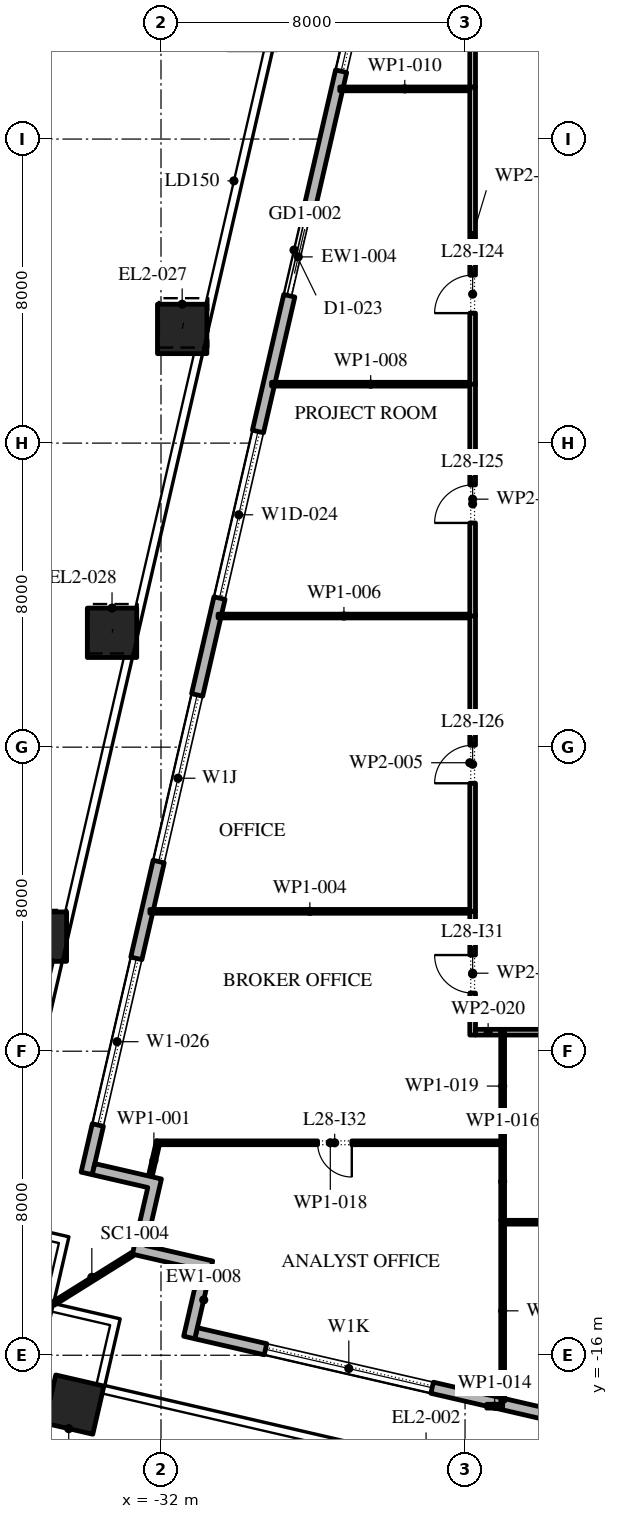
"""IFC4 building model, lengths in metres.
Left out: names, types, materials, properties, quantities, classifications, styles, units other than length and angle.
Written with IfcOpenShell. Run it as: python <this file> out.ifc"""

import sys

from ifc_helpers import new_model, si_unit, direction, frame, frame_2d, origin, origin_2d, place, context, subcontext, project, spatial, polyline, rectangle, outline, extrude, element, fill, save


model = new_model("IFC4")
c1 = context("Model", 3, precision=1e-05, world=origin(), true_north=direction((0.0, 1.0)))
c2 = subcontext(c1, "Body", "Model", "MODEL_VIEW")
j1 = project(units=[si_unit("LENGTHUNIT", "METRE"), si_unit("PLANEANGLEUNIT", "RADIAN")], contexts=[c1])
p1 = place(None, origin())
s1 = spatial("IfcSite", under=j1, at=p1, CompositionType="ELEMENT")
p2 = place(p1, origin())
s2 = spatial("IfcBuilding", under=s1, at=p2, CompositionType="ELEMENT")
p3 = place(p2, frame((0.0, 0.0, 130.8)))
s3 = spatial("IfcBuildingStorey", under=s2, at=p3, CompositionType="ELEMENT", Elevation=130.8)
p4 = place(p3, frame((-34.282, -17.298, 0.0), z_axis=(0.0, 0.0, 1.0), x_axis=(0.974370064785, -0.224951054344, 0.0)))
e1 = element("IfcColumn", 1, at=p4, inside=s3, PredefinedType="COLUMN", context=c2, shape_type="SweptSolid", body=[
    extrude(rectangle(XDim=1.3, YDim=1.3, at=origin_2d()), origin(), (0.0, 0.0, 1.0), 4.2),
])
p5 = place(p3, frame((-29.597, 18.999, 0.0), z_axis=(0.011668267153, 0.050562490995, 0.998652735462), x_axis=(-0.974391195695, 0.224859506699, 0.0)))
e2 = element("IfcColumn", 2, at=p5, inside=s3, PredefinedType="COLUMN", context=c2, shape_type="SweptSolid", body=[
    extrude(rectangle(XDim=1.3, YDim=1.3, at=origin_2d()), origin(), (0.0, 0.0, 1.0), 4.206),
])
p6 = place(p3, frame((-31.443, 11.004, 0.0), z_axis=(0.00871280379, 0.037929739166, 0.999242424008), x_axis=(-0.974617095667, 0.223878352757, 0.0)))
e3 = element("IfcColumn", 3, at=p6, inside=s3, PredefinedType="COLUMN", context=c2, shape_type="SweptSolid", body=[
    extrude(rectangle(XDim=1.3, YDim=1.3, at=origin_2d()), origin(), (0.0, 0.0, 1.0), 4.203),
])
p7 = place(p3, frame((-33.288, 3.009, 0.0), z_axis=(0.005810983994, 0.025277780376, 0.999663576552), x_axis=(-0.974579651079, 0.224041299099, 0.0)))
e4 = element("IfcColumn", 4, at=p7, inside=s3, PredefinedType="COLUMN", context=c2, shape_type="SweptSolid", body=[
    extrude(rectangle(XDim=1.3, YDim=1.3, at=origin_2d()), origin(), (0.0, 0.0, 1.0), 4.201),
])
p8 = place(p3, frame((-35.134, -4.986, 0.0), z_axis=(0.002964350345, 0.012613020097, 0.999916058652), x_axis=(-0.97347596985, 0.228789283237, 0.0)))
e5 = element("IfcColumn", 5, at=p8, inside=s3, PredefinedType="COLUMN", context=c2, shape_type="SweptSolid", body=[
    extrude(rectangle(XDim=1.3, YDim=1.3, at=origin_2d()), origin(), (0.0, 0.0, 1.0), 4.2),
])
p9 = place(p3, frame((-35.631, -15.139, 0.0), z_axis=(0.0, 0.0, 1.0), x_axis=(0.974370064785, -0.224951054344, 0.0)))
e6 = element("IfcColumn", 6, at=p9, inside=s3, PredefinedType="COLUMN", context=c2, shape_type="SweptSolid", body=[
    extrude(rectangle(XDim=1.3, YDim=1.3, at=origin_2d()), origin(), (0.0, 0.0, 1.0), 4.2),
])
p10 = place(p3, frame((-31.078, -15.421, 0.0), z_axis=(0.0, 0.0, 1.0), x_axis=(0.974370456532, -0.224949357493, 0.0)))
e7 = element("IfcWall", 7, at=p10, inside=s3, PredefinedType="STANDARD", context=c2, shape_type="SweptSolid", body=[
    extrude(rectangle(XDim=51.0, YDim=0.3, at=frame_2d((25.5, 0.0))), origin(), (0.0, 0.0, 1.0), 4.0),
])
p11 = place(p10, frame((1.875, 0.0, 0.45)))
e8 = element("IfcOpeningElement", 8, at=p11, cuts=e7, PredefinedType="OPENING", context=c2, shape_type="SweptSolid", body=[
    extrude(rectangle(XDim=4.5, YDim=2.65, at=frame_2d((2.25, 1.325))), frame((0.0, 0.16, 0.0), z_axis=(0.0, -1.0, 0.0), x_axis=(1.0, 0.0, 0.0)), (0.0, 0.0, 1.0), 0.32),
])
p12 = place(p10, frame((10.275, 0.0, 0.45)))
e9 = element("IfcOpeningElement", 9, at=p12, cuts=e7, PredefinedType="OPENING", context=c2, shape_type="SweptSolid", body=[
    extrude(rectangle(XDim=4.5, YDim=2.525, at=frame_2d((2.25, 1.262))), frame((0.0, 0.16, 0.0), z_axis=(0.0, -1.0, 0.0), x_axis=(1.0, 0.0, 0.0)), (0.0, 0.0, 1.0), 0.32),
])
p13 = place(p10, frame((18.825, 0.0, 0.45)))
e10 = element("IfcOpeningElement", 10, at=p13, cuts=e7, PredefinedType="OPENING", context=c2, shape_type="SweptSolid", body=[
    extrude(rectangle(XDim=4.5, YDim=2.5, at=frame_2d((2.25, 1.25))), frame((0.0, 0.16, 0.0), z_axis=(0.0, -1.0, 0.0), x_axis=(1.0, 0.0, 0.0)), (0.0, 0.0, 1.0), 0.32),
])
p14 = place(p10, frame((28.425, 0.0, 0.0)))
e11 = element("IfcOpeningElement", 11, at=p14, cuts=e7, PredefinedType="OPENING", context=c2, shape_type="SweptSolid", body=[
    extrude(rectangle(XDim=2.4, YDim=2.9, at=frame_2d((1.2, 1.45))), frame((0.0, 0.16, 0.0), z_axis=(0.0, -1.0, 0.0), x_axis=(1.0, 0.0, 0.0)), (0.0, 0.0, 1.0), 0.32),
])
p15 = place(p10, frame((35.925, 0.0, 0.45)))
e12 = element("IfcOpeningElement", 12, at=p15, cuts=e7, PredefinedType="OPENING", context=c2, shape_type="SweptSolid", body=[
    extrude(rectangle(XDim=4.5, YDim=2.45, at=frame_2d((2.25, 1.225))), frame((0.0, 0.16, 0.0), z_axis=(0.0, -1.0, 0.0), x_axis=(1.0, 0.0, 0.0)), (0.0, 0.0, 1.0), 0.32),
])
p16 = place(p10, frame((44.475, 0.0, 0.45)))
e13 = element("IfcOpeningElement", 13, at=p16, cuts=e7, PredefinedType="OPENING", context=c2, shape_type="SweptSolid", body=[
    extrude(rectangle(XDim=4.5, YDim=2.45, at=frame_2d((2.25, 1.225))), frame((0.0, 0.16, 0.0), z_axis=(0.0, -1.0, 0.0), x_axis=(1.0, 0.0, 0.0)), (0.0, 0.0, 1.0), 0.32),
])
p17 = place(p3, frame((-22.82, 37.016, 0.0), z_axis=(0.0, 0.0, 1.0), x_axis=(-0.224953880882, -0.974369412223, 0.0)))
e14 = element("IfcWall", 14, at=p17, inside=s3, PredefinedType="STANDARD", context=c2, shape_type="SweptSolid", body=[
    extrude(rectangle(XDim=49.5, YDim=0.3, at=frame_2d((24.75, 0.0))), origin(), (0.0, 0.0, 1.0), 4.0),
])
p18 = place(p17, frame((1.157, 0.0, 0.45)))
e15 = element("IfcOpeningElement", 15, at=p18, cuts=e14, PredefinedType="OPENING", context=c2, shape_type="SweptSolid", body=[
    extrude(rectangle(XDim=4.5, YDim=3.05, at=frame_2d((2.25, 1.525))), frame((0.0, 0.16, 0.0), z_axis=(0.0, -1.0, 0.0), x_axis=(1.0, 0.0, 0.0)), (0.0, 0.0, 1.0), 0.32),
])
p19 = place(p17, frame((8.121, 0.0, 0.45)))
e16 = element("IfcOpeningElement", 16, at=p19, cuts=e14, PredefinedType="OPENING", context=c2, shape_type="SweptSolid", body=[
    extrude(rectangle(XDim=4.5, YDim=3.05, at=frame_2d((2.25, 1.525))), frame((0.0, 0.16, 0.0), z_axis=(0.0, -1.0, 0.0), x_axis=(1.0, 0.0, 0.0)), (0.0, 0.0, 1.0), 0.32),
])
p20 = place(p17, frame((15.236, 0.0, 0.45)))
e17 = element("IfcOpeningElement", 17, at=p20, cuts=e14, PredefinedType="OPENING", context=c2, shape_type="SweptSolid", body=[
    extrude(rectangle(XDim=4.5, YDim=3.05, at=frame_2d((2.25, 1.525))), frame((0.0, 0.16, 0.0), z_axis=(0.0, -1.0, 0.0), x_axis=(1.0, 0.0, 0.0)), (0.0, 0.0, 1.0), 0.32),
])
p21 = place(p17, frame((23.4, 0.0, 0.0)))
e18 = element("IfcOpeningElement", 18, at=p21, cuts=e14, PredefinedType="OPENING", context=c2, shape_type="SweptSolid", body=[
    extrude(rectangle(XDim=2.4, YDim=3.5, at=frame_2d((1.2, 1.75))), frame((0.0, 0.16, 0.0), z_axis=(0.0, -1.0, 0.0), x_axis=(1.0, 0.0, 0.0)), (0.0, 0.0, 1.0), 0.32),
])
p22 = place(p17, frame((29.464, 0.0, 0.45)))
e19 = element("IfcOpeningElement", 19, at=p22, cuts=e14, PredefinedType="OPENING", context=c2, shape_type="SweptSolid", body=[
    extrude(rectangle(XDim=4.5, YDim=2.875, at=frame_2d((2.25, 1.438))), frame((0.0, 0.16, 0.0), z_axis=(0.0, -1.0, 0.0), x_axis=(1.0, 0.0, 0.0)), (0.0, 0.0, 1.0), 0.32),
])
p23 = place(p17, frame((36.579, 0.0, 0.45)))
e20 = element("IfcOpeningElement", 20, at=p23, cuts=e14, PredefinedType="OPENING", context=c2, shape_type="SweptSolid", body=[
    extrude(rectangle(XDim=4.5, YDim=2.675, at=frame_2d((2.25, 1.337))), frame((0.0, 0.16, 0.0), z_axis=(0.0, -1.0, 0.0), x_axis=(1.0, 0.0, 0.0)), (0.0, 0.0, 1.0), 0.32),
])
p24 = place(p17, frame((43.693, 0.0, 0.45)))
e21 = element("IfcOpeningElement", 21, at=p24, cuts=e14, PredefinedType="OPENING", context=c2, shape_type="SweptSolid", body=[
    extrude(rectangle(XDim=4.5, YDim=3.05, at=frame_2d((2.25, 1.525))), frame((0.0, 0.16, 0.0), z_axis=(0.0, -1.0, 0.0), x_axis=(1.0, 0.0, 0.0)), (0.0, 0.0, 1.0), 0.32),
])
p25 = place(p3, origin())
e22 = element("IfcWall", 22, at=p25, inside=s3, PredefinedType="STANDARD", context=c2, shape_type="SweptSolid", body=[
    extrude(outline(polyline([(-32.393, -13.116), (-30.639, -13.521), (-31.111, -15.567), (-31.404, -15.5), (-30.999, -13.746), (-32.753, -13.341), (-32.348, -11.587), (-33.809, -11.25), (-33.742, -10.957), (-31.988, -11.362), (-32.393, -13.116)])), origin(), (0.0, 0.0, 1.0), 4.0),
])
p26 = place(p3, frame((-32.753, -13.341, -0.05), z_axis=(0.0, 0.0, 1.0), x_axis=(-0.848059759764, -0.529900598103, 0.0)))
e23 = element("IfcWall", 23, at=p26, inside=s3, PredefinedType="STANDARD", context=c2, shape_type="SweptSolid", body=[
    extrude(rectangle(XDim=2.455, YDim=0.1, at=frame_2d((1.228, 0.0))), origin(), (0.0, 0.0, 1.0), 4.05),
])
p27 = place(p3, frame((-32.069, -10.361, 0.0), z_axis=(0.0, 0.0, 1.0), x_axis=(-0.222987762652, -0.974821243976, 0.0)))
e24 = element("IfcWall", 24, at=p27, inside=s3, PredefinedType="PARTITIONING", context=c2, shape_type="SweptSolid", body=[
    extrude(rectangle(XDim=1.058, YDim=0.1, at=frame_2d((0.529, 0.0))), origin(), (0.0, 0.0, 1.0), 4.0),
])
p28 = place(p3, frame((-23.8, -7.575, 0.0), z_axis=(0.0, 0.0, 1.0), x_axis=(0.0, 1.0, 0.0)))
e25 = element("IfcWall", 25, at=p28, inside=s3, PredefinedType="PARTITIONING", context=c2, shape_type="SweptSolid", body=[
    extrude(rectangle(XDim=3.255, YDim=0.15, at=frame_2d((1.627, 0.0))), origin(), (0.0, 0.0, 1.0), 4.0),
])
p29 = place(p28, frame((1.105, 0.0, 0.0)))
e26 = element("IfcOpeningElement", 26, at=p29, cuts=e25, PredefinedType="OPENING", context=c2, shape_type="SweptSolid", body=[
    extrude(rectangle(XDim=1.0, YDim=2.1, at=frame_2d((0.5, 1.05))), frame((0.0, 0.085, 0.0), z_axis=(0.0, -1.0, 0.0), x_axis=(1.0, 0.0, 0.0)), (0.0, 0.0, 1.0), 0.17),
])
p30 = place(p3, frame((-23.875, -4.32, 0.0), z_axis=(0.0, 0.0, 1.0), x_axis=(-1.0, 0.0, 0.0)))
e27 = element("IfcWall", 27, at=p30, inside=s3, PredefinedType="PARTITIONING", context=c2, shape_type="SweptSolid", body=[
    extrude(rectangle(XDim=8.417, YDim=0.1, at=frame_2d((4.208, 0.0))), origin(), (0.0, 0.0, 1.0), 4.0),
])
p31 = place(p3, frame((-23.8, -4.32, 0.0), z_axis=(0.0, 0.0, 1.0), x_axis=(0.0, 1.0, 0.0)))
e28 = element("IfcWall", 28, at=p31, inside=s3, PredefinedType="PARTITIONING", context=c2, shape_type="SweptSolid", body=[
    extrude(rectangle(XDim=7.82, YDim=0.15, at=frame_2d((3.91, 0.0))), origin(), (0.0, 0.0, 1.0), 4.0),
])
p32 = place(p31, frame((3.37, 0.0, 0.0)))
e29 = element("IfcOpeningElement", 29, at=p32, cuts=e28, PredefinedType="OPENING", context=c2, shape_type="SweptSolid", body=[
    extrude(rectangle(XDim=1.0, YDim=2.1, at=frame_2d((0.5, 1.05))), frame((0.0, 0.085, 0.0), z_axis=(0.0, -1.0, 0.0), x_axis=(1.0, 0.0, 0.0)), (0.0, 0.0, 1.0), 0.17),
])
p33 = place(p3, frame((-23.875, 3.45, 0.0), z_axis=(0.0, 0.0, 1.0), x_axis=(-1.0, 0.0, 0.0)))
e30 = element("IfcWall", 30, at=p33, inside=s3, PredefinedType="PARTITIONING", context=c2, shape_type="SweptSolid", body=[
    extrude(rectangle(XDim=6.623, YDim=0.1, at=frame_2d((3.312, 0.0))), origin(), (0.0, 0.0, 1.0), 4.0),
])
p34 = place(p3, frame((-23.8, 3.45, 0.0), z_axis=(0.0, 0.0, 1.0), x_axis=(0.0, 1.0, 0.0)))
e31 = element("IfcWall", 31, at=p34, inside=s3, PredefinedType="PARTITIONING", context=c2, shape_type="SweptSolid", body=[
    extrude(rectangle(XDim=6.15, YDim=0.15, at=frame_2d((3.075, 0.0))), origin(), (0.0, 0.0, 1.0), 4.0),
])
p35 = place(p34, frame((2.45, 0.0, 0.0)))
e32 = element("IfcOpeningElement", 32, at=p35, cuts=e31, PredefinedType="OPENING", context=c2, shape_type="SweptSolid", body=[
    extrude(rectangle(XDim=1.0, YDim=2.1, at=frame_2d((0.5, 1.05))), frame((0.0, 0.085, 0.0), z_axis=(0.0, -1.0, 0.0), x_axis=(1.0, 0.0, 0.0)), (0.0, 0.0, 1.0), 0.17),
])
p36 = place(p3, frame((-23.875, 9.55, 0.0), z_axis=(0.0, 0.0, 1.0), x_axis=(-1.0, 0.0, 0.0)))
e33 = element("IfcWall", 33, at=p36, inside=s3, PredefinedType="PARTITIONING", context=c2, shape_type="SweptSolid", body=[
    extrude(rectangle(XDim=5.215, YDim=0.1, at=frame_2d((2.607, 0.0))), origin(), (0.0, 0.0, 1.0), 4.0),
])
p37 = place(p3, frame((-23.8, 9.55, 0.0), z_axis=(0.0, 0.0, 1.0), x_axis=(0.0, 1.0, 0.0)))
e34 = element("IfcWall", 34, at=p37, inside=s3, PredefinedType="PARTITIONING", context=c2, shape_type="SweptSolid", body=[
    extrude(rectangle(XDim=7.82, YDim=0.15, at=frame_2d((3.91, 0.0))), origin(), (0.0, 0.0, 1.0), 4.0),
])
p38 = place(p37, frame((1.87, 0.0, 0.0)))
e35 = element("IfcOpeningElement", 35, at=p38, cuts=e34, PredefinedType="OPENING", context=c2, shape_type="SweptSolid", body=[
    extrude(rectangle(XDim=1.0, YDim=2.1, at=frame_2d((0.5, 1.05))), frame((0.0, 0.085, 0.0), z_axis=(0.0, -1.0, 0.0), x_axis=(1.0, 0.0, 0.0)), (0.0, 0.0, 1.0), 0.17),
])
p39 = place(p3, frame((-23.875, 17.32, 0.0), z_axis=(0.0, 0.0, 1.0), x_axis=(-1.0, 0.0, 0.0)))
e36 = element("IfcWall", 36, at=p39, inside=s3, PredefinedType="PARTITIONING", context=c2, shape_type="SweptSolid", body=[
    extrude(rectangle(XDim=3.421, YDim=0.1, at=frame_2d((1.71, 0.0))), origin(), (0.0, 0.0, 1.0), 4.0),
])
p40 = place(p3, frame((-23.8, 17.37, 0.0), z_axis=(0.0, 0.0, 1.0), x_axis=(0.0, 1.0, 0.0)))
e37 = element("IfcWall", 37, at=p40, inside=s3, PredefinedType="PARTITIONING", context=c2, shape_type="SweptSolid", body=[
    extrude(rectangle(XDim=6.115, YDim=0.15, at=frame_2d((3.058, 0.0))), origin(), (0.0, 0.0, 1.0), 4.0),
])
p41 = place(p40, frame((1.89, 0.0, 0.0)))
e38 = element("IfcOpeningElement", 38, at=p41, cuts=e37, PredefinedType="OPENING", context=c2, shape_type="SweptSolid", body=[
    extrude(rectangle(XDim=1.0, YDim=2.1, at=frame_2d((0.5, 1.05))), frame((0.0, 0.085, 0.0), z_axis=(0.0, -1.0, 0.0), x_axis=(1.0, 0.0, 0.0)), (0.0, 0.0, 1.0), 0.17),
])
p42 = place(p3, frame((-23.43, -17.34, 0.0), z_axis=(0.0, 0.0, 1.0), x_axis=(1.0, 0.0, 0.0)))
e39 = element("IfcWall", 39, at=p42, inside=s3, PredefinedType="PARTITIONING", context=c2, shape_type="SweptSolid", body=[
    extrude(rectangle(XDim=0.42, YDim=0.1, at=frame_2d((0.21, 0.0))), origin(), (0.0, 0.0, 1.0), 4.0),
])
p43 = place(p3, frame((-23.01, -17.212, 0.0), z_axis=(0.0, 0.0, 1.0), x_axis=(0.0, 1.0, 0.0)))
e40 = element("IfcWall", 40, at=p43, inside=s3, PredefinedType="PARTITIONING", context=c2, shape_type="SweptSolid", body=[
    extrude(rectangle(XDim=4.762, YDim=0.1, at=frame_2d((2.381, 0.0))), origin(), (0.0, 0.0, 1.0), 4.0),
])
p44 = place(p3, frame((-23.01, -12.45, 0.0), z_axis=(0.0, 0.0, 1.0), x_axis=(0.0, 1.0, 0.0)))
e41 = element("IfcWall", 41, at=p44, inside=s3, PredefinedType="PARTITIONING", context=c2, shape_type="SweptSolid", body=[
    extrude(rectangle(XDim=2.04, YDim=0.1, at=frame_2d((1.02, 0.0))), origin(), (0.0, 0.0, 1.0), 4.0),
])
p45 = place(p3, frame((-22.96, -12.5, 0.0), z_axis=(0.0, 0.0, 1.0), x_axis=(1.0, 0.0, 0.0)))
e42 = element("IfcWall", 42, at=p45, inside=s3, PredefinedType="PARTITIONING", context=c2, shape_type="SweptSolid", body=[
    extrude(rectangle(XDim=9.51, YDim=0.1, at=frame_2d((4.755, 0.0))), origin(), (0.0, 0.0, 1.0), 4.0),
])
p46 = place(p45, frame((3.4, 0.0, 0.0)))
e43 = element("IfcOpeningElement", 43, at=p46, cuts=e42, PredefinedType="OPENING", context=c2, shape_type="SweptSolid", body=[
    extrude(rectangle(XDim=0.9, YDim=2.1, at=frame_2d((0.45, 1.05))), frame((0.0, 0.06, 0.0), z_axis=(0.0, -1.0, 0.0), x_axis=(1.0, 0.0, 0.0)), (0.0, 0.0, 1.0), 0.12),
])
p47 = place(p3, frame((-23.06, -10.41, 0.0), z_axis=(0.0, 0.0, 1.0), x_axis=(-1.0, 0.0, 0.0)))
e44 = element("IfcWall", 44, at=p47, inside=s3, PredefinedType="PARTITIONING", context=c2, shape_type="SweptSolid", body=[
    extrude(rectangle(XDim=8.97, YDim=0.1, at=frame_2d((4.485, 0.0))), origin(), (0.0, 0.0, 1.0), 4.0),
])
p48 = place(p47, frame((3.92, 0.0, 0.0)))
e45 = element("IfcOpeningElement", 45, at=p48, cuts=e44, PredefinedType="OPENING", context=c2, shape_type="SweptSolid", body=[
    extrude(rectangle(XDim=0.9, YDim=2.1, at=frame_2d((0.45, 1.05))), frame((0.0, 0.06, 0.0), z_axis=(0.0, -1.0, 0.0), x_axis=(1.0, 0.0, 0.0)), (0.0, 0.0, 1.0), 0.12),
])
p49 = place(p3, frame((-23.01, -10.41, 0.0), z_axis=(0.0, 0.0, 1.0), x_axis=(0.0, 1.0, 0.0)))
e46 = element("IfcWall", 46, at=p49, inside=s3, PredefinedType="PARTITIONING", context=c2, shape_type="SweptSolid", body=[
    extrude(rectangle(XDim=2.985, YDim=0.1, at=frame_2d((1.492, 0.0))), origin(), (0.0, 0.0, 1.0), 4.0),
])
p50 = place(p3, frame((-23.06, -7.5, 0.0), z_axis=(0.0, 0.0, 1.0), x_axis=(-1.0, 0.0, 0.0)))
e47 = element("IfcWall", 47, at=p50, inside=s3, PredefinedType="PARTITIONING", context=c2, shape_type="SweptSolid", body=[
    extrude(rectangle(XDim=0.665, YDim=0.15, at=frame_2d((0.333, 0.0))), origin(), (0.0, 0.0, 1.0), 4.0),
])
p51 = place(p3, frame((-13.55, -7.5, 0.0), z_axis=(0.0, 0.0, 1.0), x_axis=(-1.0, 0.0, 0.0)))
e48 = element("IfcWall", 48, at=p51, inside=s3, PredefinedType="PARTITIONING", context=c2, shape_type="SweptSolid", body=[
    extrude(rectangle(XDim=9.41, YDim=0.15, at=frame_2d((4.705, 0.0))), origin(), (0.0, 0.0, 1.0), 4.0),
])
p52 = place(p51, frame((6.06, 0.0, 0.0)))
e49 = element("IfcOpeningElement", 49, at=p52, cuts=e48, PredefinedType="OPENING", context=c2, shape_type="SweptSolid", body=[
    extrude(rectangle(XDim=1.0, YDim=2.1, at=frame_2d((0.5, 1.05))), frame((0.0, 0.085, 0.0), z_axis=(0.0, -1.0, 0.0), x_axis=(1.0, 0.0, 0.0)), (0.0, 0.0, 1.0), 0.17),
])
p53 = place(p11, origin())
e50 = element("IfcWindow", 50, at=p53, inside=s3, PartitioningType="DOUBLE_PANEL_VERTICAL", PredefinedType="WINDOW", context=c2, shape_type="SweptSolid", body=[
    extrude(rectangle(XDim=4.5, YDim=2.65, at=frame_2d((2.25, 1.325))), frame((0.0, 0.03, 0.0), z_axis=(0.0, -1.0, 0.0), x_axis=(1.0, 0.0, 0.0)), (0.0, 0.0, 1.0), 0.06),
])
fill(e8, e50)
p54 = place(p20, origin())
e51 = element("IfcWindow", 51, at=p54, inside=s3, PartitioningType="DOUBLE_PANEL_VERTICAL", PredefinedType="WINDOW", context=c2, shape_type="SweptSolid", body=[
    extrude(rectangle(XDim=4.5, YDim=3.05, at=frame_2d((2.25, 1.525))), frame((0.0, 0.03, 0.0), z_axis=(0.0, -1.0, 0.0), x_axis=(1.0, 0.0, 0.0)), (0.0, 0.0, 1.0), 0.06),
])
fill(e17, e51)
p55 = place(p21, origin())
e52 = element("IfcDoor", 52, at=p55, inside=s3, OperationType="DOUBLE_DOOR_SLIDING", PredefinedType="DOOR", context=c2, shape_type="SweptSolid", body=[
    extrude(rectangle(XDim=2.4, YDim=3.5, at=frame_2d((1.2, 1.75))), frame((0.0, 0.025, 0.0), z_axis=(0.0, -1.0, 0.0), x_axis=(1.0, 0.0, 0.0)), (0.0, 0.0, 1.0), 0.05),
])
fill(e18, e52)
p56 = place(p22, origin())
e53 = element("IfcWindow", 53, at=p56, inside=s3, PartitioningType="DOUBLE_PANEL_VERTICAL", PredefinedType="WINDOW", context=c2, shape_type="SweptSolid", body=[
    extrude(rectangle(XDim=4.5, YDim=2.875, at=frame_2d((2.25, 1.438))), frame((0.0, 0.03, 0.0), z_axis=(0.0, -1.0, 0.0), x_axis=(1.0, 0.0, 0.0)), (0.0, 0.0, 1.0), 0.06),
])
fill(e19, e53)
p57 = place(p23, origin())
e54 = element("IfcWindow", 54, at=p57, inside=s3, PartitioningType="DOUBLE_PANEL_VERTICAL", PredefinedType="WINDOW", context=c2, shape_type="SweptSolid", body=[
    extrude(rectangle(XDim=4.5, YDim=2.675, at=frame_2d((2.25, 1.337))), frame((0.0, 0.03, 0.0), z_axis=(0.0, -1.0, 0.0), x_axis=(1.0, 0.0, 0.0)), (0.0, 0.0, 1.0), 0.06),
])
fill(e20, e54)
p58 = place(p24, origin())
e55 = element("IfcWindow", 55, at=p58, inside=s3, PartitioningType="DOUBLE_PANEL_VERTICAL", PredefinedType="WINDOW", context=c2, shape_type="SweptSolid", body=[
    extrude(rectangle(XDim=4.5, YDim=3.05, at=frame_2d((2.25, 1.525))), frame((0.0, 0.03, 0.0), z_axis=(0.0, -1.0, 0.0), x_axis=(1.0, 0.0, 0.0)), (0.0, 0.0, 1.0), 0.06),
])
fill(e21, e55)
p59 = place(p38, origin())
e56 = element("IfcDoor", 56, at=p59, inside=s3, OperationType="SINGLE_SWING_RIGHT", PredefinedType="DOOR", context=c2, shape_type="SweptSolid", body=[
    extrude(rectangle(XDim=1.0, YDim=2.1, at=frame_2d((0.5, 1.05))), frame((0.0, 0.025, 0.0), z_axis=(0.0, -1.0, 0.0), x_axis=(1.0, 0.0, 0.0)), (0.0, 0.0, 1.0), 0.05),
])
fill(e35, e56)
p60 = place(p35, origin())
e57 = element("IfcDoor", 57, at=p60, inside=s3, OperationType="SINGLE_SWING_RIGHT", PredefinedType="DOOR", context=c2, shape_type="SweptSolid", body=[
    extrude(rectangle(XDim=1.0, YDim=2.1, at=frame_2d((0.5, 1.05))), frame((0.0, 0.025, 0.0), z_axis=(0.0, -1.0, 0.0), x_axis=(1.0, 0.0, 0.0)), (0.0, 0.0, 1.0), 0.05),
])
fill(e32, e57)
p61 = place(p32, origin())
e58 = element("IfcDoor", 58, at=p61, inside=s3, OperationType="SINGLE_SWING_RIGHT", PredefinedType="DOOR", context=c2, shape_type="SweptSolid", body=[
    extrude(rectangle(XDim=1.0, YDim=2.1, at=frame_2d((0.5, 1.05))), frame((0.0, 0.025, 0.0), z_axis=(0.0, -1.0, 0.0), x_axis=(1.0, 0.0, 0.0)), (0.0, 0.0, 1.0), 0.05),
])
fill(e29, e58)
p62 = place(p29, origin())
e59 = element("IfcDoor", 59, at=p62, inside=s3, OperationType="SINGLE_SWING_LEFT", PredefinedType="DOOR", context=c2, shape_type="SweptSolid", body=[
    extrude(rectangle(XDim=1.0, YDim=2.1, at=frame_2d((0.5, 1.05))), frame((0.0, 0.025, 0.0), z_axis=(0.0, -1.0, 0.0), x_axis=(1.0, 0.0, 0.0)), (0.0, 0.0, 1.0), 0.05),
])
fill(e26, e59)
p63 = place(p48, origin())
e60 = element("IfcDoor", 60, at=p63, inside=s3, OperationType="SINGLE_SWING_RIGHT", PredefinedType="DOOR", context=c2, shape_type="SweptSolid", body=[
    extrude(rectangle(XDim=0.9, YDim=2.1, at=frame_2d((0.45, 1.05))), frame((0.0, 0.025, 0.0), z_axis=(0.0, -1.0, 0.0), x_axis=(1.0, 0.0, 0.0)), (0.0, 0.0, 1.0), 0.05),
])
fill(e45, e60)
save(model, sys.argv[1])
